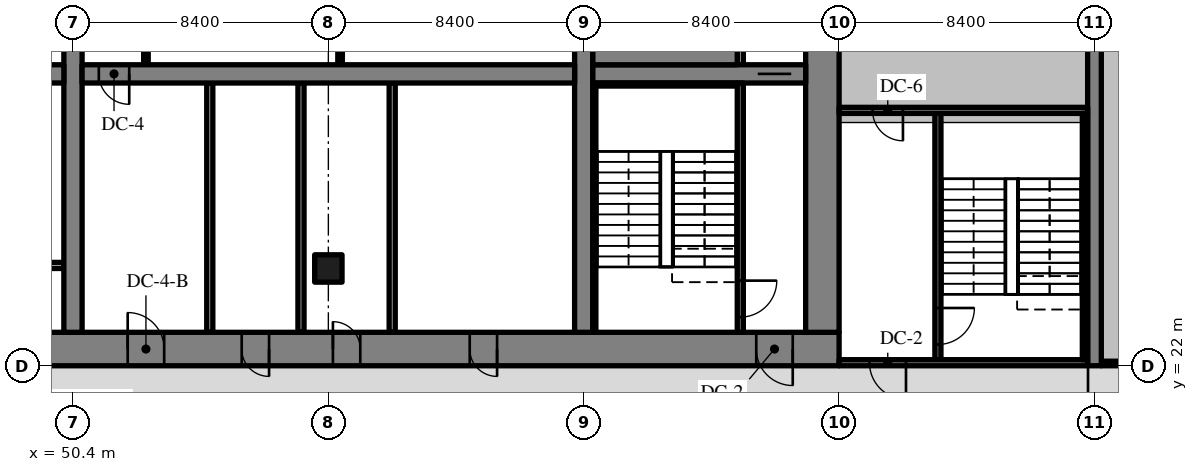
"""IFC4 building model, lengths in metres.
Left out: names, types, materials, properties, quantities, classifications, styles, units other than length and angle.
Written with IfcOpenShell. Run it as: python <this file> out.ifc"""

import sys

from ifc_helpers import new_model, si_unit, direction, frame, frame_2d, origin, origin_2d, place, context, subcontext, project, spatial, rectangle, extrude, source, transform, mapped, element, fill, save


model = new_model("IFC4")
c1 = context("Model", 3, precision=1e-05, world=origin(), true_north=direction((0.0, 1.0)))
c2 = subcontext(c1, "Body", "Model", "MODEL_VIEW")
j1 = project(units=[si_unit("LENGTHUNIT", "METRE"), si_unit("PLANEANGLEUNIT", "RADIAN")], contexts=[c1])
p1 = place(None, origin())
s1 = spatial("IfcSite", under=j1, at=p1, CompositionType="ELEMENT")
p2 = place(p1, origin())
s2 = spatial("IfcBuilding", under=s1, at=p2, CompositionType="ELEMENT")
p3 = place(p2, frame((0.0, 0.0, -13.5)))
s3 = spatial("IfcBuildingStorey", under=s2, at=p3, CompositionType="ELEMENT", Elevation=-13.5)
m1 = source(origin(), c2, "Body", "SweptSolid", [
    extrude(rectangle(XDim=50.4, YDim=1.1, at=frame_2d((25.2, 0.0))), origin(), (0.0, 0.0, 1.0), 4.52),
])
p4 = place(p3, frame((25.2, 22.55, -0.3), z_axis=(0.0, 0.0, 1.0), x_axis=(1.0, 0.0, 0.0)))
e1 = element("IfcWall", 1, at=p4, inside=s3, PredefinedType="SHEAR", context=c2, shape_type="MappedRepresentation", body=[
    mapped(m1, transform((0.0, 0.0, 0.0), scale=1.0)),
])
m2 = source(origin(), c2, "Body", "SweptSolid", [
    extrude(rectangle(XDim=1.8, YDim=2.1, at=frame_2d((0.9, 1.05))), frame((0.0, 0.56, 0.0), z_axis=(0.0, -1.0, 0.0), x_axis=(1.0, 0.0, 0.0)), (0.0, 0.0, 1.0), 1.12),
])
p5 = place(p4, frame((15.9, 0.0, 0.0)))
e2 = element("IfcOpeningElement", 2, at=p5, cuts=e1, PredefinedType="OPENING", context=c2, shape_type="MappedRepresentation", body=[
    mapped(m2, transform((0.0, 0.0, 0.0), scale=1.0)),
])
m3 = source(origin(), c2, "Body", "SweptSolid", [
    extrude(rectangle(XDim=1.2, YDim=2.1, at=frame_2d((0.6, 1.05))), frame((0.0, 0.56, 0.0), z_axis=(0.0, -1.0, 0.0), x_axis=(1.0, 0.0, 0.0)), (0.0, 0.0, 1.0), 1.12),
])
p6 = place(p4, frame((27.0, 0.0, 0.0)))
e3 = element("IfcOpeningElement", 3, at=p6, cuts=e1, PredefinedType="OPENING", context=c2, shape_type="MappedRepresentation", body=[
    mapped(m3, transform((0.0, 0.0, 0.0), scale=1.0)),
])
m4 = source(origin(), c2, "Body", "SweptSolid", [
    extrude(rectangle(XDim=0.9, YDim=2.1, at=frame_2d((0.45, 1.05))), frame((0.0, 0.56, 0.0), z_axis=(0.0, -1.0, 0.0), x_axis=(1.0, 0.0, 0.0)), (0.0, 0.0, 1.0), 1.12),
])
p7 = place(p4, frame((33.75, 0.0, 0.0)))
e4 = element("IfcOpeningElement", 4, at=p7, cuts=e1, PredefinedType="OPENING", context=c2, shape_type="MappedRepresentation", body=[
    mapped(m4, transform((0.0, 0.0, 0.0), scale=1.0)),
])
p8 = place(p4, frame((30.75, 0.0, 0.0)))
e5 = element("IfcOpeningElement", 5, at=p8, cuts=e1, PredefinedType="OPENING", context=c2, shape_type="MappedRepresentation", body=[
    mapped(m4, transform((0.0, 0.0, 0.0), scale=1.0)),
])
p9 = place(p4, frame((38.25, 0.0, 0.0)))
e6 = element("IfcOpeningElement", 6, at=p9, cuts=e1, PredefinedType="OPENING", context=c2, shape_type="MappedRepresentation", body=[
    mapped(m4, transform((0.0, 0.0, 0.0), scale=1.0)),
])
p10 = place(p4, frame((6.425, 0.0, 0.0)))
e7 = element("IfcOpeningElement", 7, at=p10, cuts=e1, PredefinedType="OPENING", context=c2, shape_type="MappedRepresentation", body=[
    mapped(m3, transform((0.0, 0.0, 0.0), scale=1.0)),
])
p11 = place(p4, frame((47.675, 0.0, 0.0)))
e8 = element("IfcOpeningElement", 8, at=p11, cuts=e1, PredefinedType="OPENING", context=c2, shape_type="MappedRepresentation", body=[
    mapped(m3, transform((0.0, 0.0, 0.0), scale=1.0)),
])
m5 = source(origin(), c2, "Body", "SweptSolid", [
    extrude(rectangle(XDim=17.8, YDim=1.1, at=frame_2d((8.9, 0.0))), origin(), (0.0, 0.0, 1.0), 4.52),
])
p12 = place(p3, frame((75.05, 23.1, -0.3), z_axis=(0.0, 0.0, 1.0), x_axis=(0.0, 1.0, 0.0)))
e9 = element("IfcWall", 9, at=p12, inside=s3, PredefinedType="SHEAR", context=c2, shape_type="MappedRepresentation", body=[
    mapped(m5, transform((0.0, 0.0, 0.0), scale=1.0)),
])
m6 = source(origin(), c2, "Body", "SweptSolid", [
    extrude(rectangle(XDim=17.8, YDim=0.6, at=frame_2d((8.9, 0.0))), origin(), (0.0, 0.0, 1.0), 4.52),
])
p13 = place(p3, frame((50.4, 23.1, -0.3), z_axis=(0.0, 0.0, 1.0), x_axis=(0.0, 1.0, 0.0)))
e10 = element("IfcWall", 10, at=p13, inside=s3, PredefinedType="SHEAR", context=c2, shape_type="MappedRepresentation", body=[
    mapped(m6, transform((0.0, 0.0, 0.0), scale=1.0)),
])
m7 = source(origin(), c2, "Body", "SweptSolid", [
    extrude(rectangle(XDim=1.1, YDim=2.1, at=frame_2d((0.55, 1.05))), frame((0.0, 0.31, 0.0), z_axis=(0.0, -1.0, 0.0), x_axis=(1.0, 0.0, 0.0)), (0.0, 0.0, 1.0), 0.62),
])
p14 = place(p13, frame((12.35, 0.0, 0.0)))
e11 = element("IfcOpeningElement", 11, at=p14, cuts=e10, PredefinedType="OPENING", context=c2, shape_type="MappedRepresentation", body=[
    mapped(m7, transform((0.0, 0.0, 0.0), scale=1.0)),
])
p15 = place(p3, frame((67.2, 23.1, -0.3), z_axis=(0.0, 0.0, 1.0), x_axis=(0.0, 1.0, 0.0)))
e12 = element("IfcWall", 12, at=p15, inside=s3, PredefinedType="SHEAR", context=c2, shape_type="MappedRepresentation", body=[
    mapped(m6, transform((0.0, 0.0, 0.0), scale=1.0)),
])
m8 = source(origin(), c2, "Body", "SweptSolid", [
    extrude(rectangle(XDim=16.2, YDim=0.6, at=frame_2d((8.1, 0.0))), origin(), (0.0, 0.0, 1.0), 4.52),
])
p16 = place(p3, frame((33.9, 31.6, -0.3), z_axis=(0.0, 0.0, 1.0), x_axis=(1.0, 0.0, 0.0)))
e13 = element("IfcWall", 13, at=p16, inside=s3, PredefinedType="SHEAR", context=c2, shape_type="MappedRepresentation", body=[
    mapped(m8, transform((0.0, 0.0, 0.0), scale=1.0)),
])
m9 = source(origin(), c2, "Body", "SweptSolid", [
    extrude(rectangle(XDim=1.0, YDim=2.1, at=frame_2d((0.5, 1.05))), frame((0.0, 0.31, 0.0), z_axis=(0.0, -1.0, 0.0), x_axis=(1.0, 0.0, 0.0)), (0.0, 0.0, 1.0), 0.62),
])
p17 = place(p16, frame((14.65, 0.0, 0.0)))
e14 = element("IfcOpeningElement", 14, at=p17, cuts=e13, PredefinedType="OPENING", context=c2, shape_type="MappedRepresentation", body=[
    mapped(m9, transform((0.0, 0.0, 0.0), scale=1.0)),
])
m10 = source(origin(), c2, "Body", "SweptSolid", [
    extrude(rectangle(XDim=16.2, YDim=0.6, at=frame_2d((8.1, 0.0))), origin(), (0.0, 0.0, 1.0), 4.52),
])
p18 = place(p3, frame((50.7, 31.6, -0.3), z_axis=(0.0, 0.0, 1.0), x_axis=(1.0, 0.0, 0.0)))
e15 = element("IfcWall", 15, at=p18, inside=s3, PredefinedType="SHEAR", context=c2, shape_type="MappedRepresentation", body=[
    mapped(m10, transform((0.0, 0.0, 0.0), scale=1.0)),
])
p19 = place(p18, frame((0.55, 0.0, 0.0)))
e16 = element("IfcOpeningElement", 16, at=p19, cuts=e15, PredefinedType="OPENING", context=c2, shape_type="MappedRepresentation", body=[
    mapped(m9, transform((0.0, 0.0, 0.0), scale=1.0)),
])
m11 = source(origin(), c2, "Body", "SweptSolid", [
    extrude(rectangle(XDim=7.0, YDim=0.6, at=frame_2d((3.5, 0.0))), origin(), (0.0, 0.0, 1.0), 4.52),
])
p20 = place(p3, frame((67.5, 31.6, -0.3), z_axis=(0.0, 0.0, 1.0), x_axis=(1.0, 0.0, 0.0)))
e17 = element("IfcWall", 17, at=p20, inside=s3, PredefinedType="SHEAR", context=c2, shape_type="MappedRepresentation", body=[
    mapped(m11, transform((0.0, 0.0, 0.0), scale=1.0)),
])
p21 = place(p20, frame((5.425, 0.0, 0.0)))
e18 = element("IfcOpeningElement", 18, at=p21, cuts=e17, PredefinedType="OPENING", context=c2, shape_type="MappedRepresentation", body=[
    mapped(m7, transform((0.0, 0.0, 0.0), scale=1.0)),
])
m12 = source(origin(), c2, "Body", "SweptSolid", [
    extrude(rectangle(XDim=20.0, YDim=0.45, at=frame_2d((10.0, 0.0))), origin(), (0.0, 0.0, 1.0), 4.52),
])
p22 = place(p3, frame((84.0, 22.0, -0.3), z_axis=(0.0, 0.0, 1.0), x_axis=(0.0, 1.0, 0.0)))
e19 = element("IfcWall", 19, at=p22, inside=s3, PredefinedType="SHEAR", context=c2, shape_type="MappedRepresentation", body=[
    mapped(m12, transform((0.0, 0.0, 0.0), scale=1.0)),
])
m13 = source(origin(), c2, "Body", "SweptSolid", [
    extrude(rectangle(XDim=0.9, YDim=0.9, at=origin_2d()), origin(), (0.0, 0.0, 1.0), 4.52),
])
p23 = place(p3, frame((58.8, 25.2, -0.3), z_axis=(0.0, 0.0, 1.0), x_axis=(1.0, 0.0, 0.0)))
e20 = element("IfcColumn", 20, at=p23, inside=s3, PredefinedType="COLUMN", context=c2, shape_type="MappedRepresentation", body=[
    mapped(m13, transform((0.0, 0.0, 0.0), scale=1.0)),
])
m14 = source(origin(), c2, "Body", "SweptSolid", [
    extrude(rectangle(XDim=6.0, YDim=0.2, at=frame_2d((3.0, 0.0))), origin(), (0.0, 0.0, 1.0), 4.22),
])
p24 = place(p3, frame((44.1, 25.3, 0.0), z_axis=(0.0, 0.0, 1.0), x_axis=(1.0, 0.0, 0.0)))
e21 = element("IfcWall", 21, at=p24, inside=s3, PredefinedType="SOLIDWALL", context=c2, shape_type="MappedRepresentation", body=[
    mapped(m14, transform((0.0, 0.0, 0.0), scale=1.0)),
])
m15 = source(origin(), c2, "Body", "SweptSolid", [
    extrude(rectangle(XDim=1.1, YDim=2.1, at=frame_2d((0.55, 1.05))), frame((0.0, 0.11, 0.0), z_axis=(0.0, -1.0, 0.0), x_axis=(1.0, 0.0, 0.0)), (0.0, 0.0, 1.0), 0.22),
])
p25 = place(p24, frame((0.95, 0.0, 0.0)))
e22 = element("IfcOpeningElement", 22, at=p25, cuts=e21, PredefinedType="OPENING", context=c2, shape_type="MappedRepresentation", body=[
    mapped(m15, transform((0.0, 0.0, 0.0), scale=1.0)),
])
p26 = place(p24, frame((3.95, 0.0, 0.0)))
e23 = element("IfcOpeningElement", 23, at=p26, cuts=e21, PredefinedType="OPENING", context=c2, shape_type="MappedRepresentation", body=[
    mapped(m15, transform((0.0, 0.0, 0.0), scale=1.0)),
])
m16 = source(origin(), c2, "Body", "SweptSolid", [
    extrude(rectangle(XDim=8.2, YDim=0.2, at=frame_2d((4.1, 0.0))), origin(), (0.0, 0.0, 1.0), 4.22),
])
for number, where, z_axis, x_axis in (
    (24, (54.9, 23.1, 0.0), (0.0, 0.0, 1.0), (0.0, 1.0, 0.0)),
    (25, (60.9, 23.1, 0.0), (0.0, 0.0, 1.0), (0.0, 1.0, 0.0)),
    (26, (57.9, 23.1, 0.0), (0.0, 0.0, 1.0), (0.0, 1.0, 0.0)),
):
    element("IfcWall", number, at=place(p3, frame(where, z_axis=z_axis, x_axis=x_axis)), inside=s3, PredefinedType="PARTITIONING", context=c2, shape_type="MappedRepresentation", body=[
        mapped(m16, transform((0.0, 0.0, 0.0), scale=1.0)),
    ])
m17 = source(origin(), c2, "Body", "SweptSolid", [
    extrude(rectangle(XDim=3.1, YDim=0.15, at=frame_2d((1.55, 0.0))), origin(), (0.0, 0.0, 1.0), 4.22),
])
for number, where, z_axis, x_axis in (
    (27, (52.8, 31.9, 0.0), (0.0, 0.0, 1.0), (0.0, 1.0, 0.0)),
    (28, (59.186, 31.9, 0.0), (0.0, 0.0, 1.0), (0.0, 1.0, 0.0)),
):
    element("IfcWall", number, at=place(p3, frame(where, z_axis=z_axis, x_axis=x_axis)), inside=s3, PredefinedType="PARTITIONING", context=c2, shape_type="MappedRepresentation", body=[
        mapped(m17, transform((0.0, 0.0, 0.0), scale=1.0)),
    ])
m18 = source(origin(), c2, "Body", "SweptSolid", [
    extrude(rectangle(XDim=8.2, YDim=0.2, at=frame_2d((4.1, 0.0))), origin(), (0.0, 0.0, 1.0), 4.52),
])
p27 = place(p3, frame((72.35, 23.1, -0.3), z_axis=(0.0, 0.0, 1.0), x_axis=(0.0, 1.0, 0.0)))
e29 = element("IfcWall", 29, at=p27, inside=s3, PredefinedType="SOLIDWALL", context=c2, shape_type="MappedRepresentation", body=[
    mapped(m18, transform((0.0, 0.0, 0.0), scale=1.0)),
])
m19 = source(origin(), c2, "Body", "SweptSolid", [
    extrude(rectangle(XDim=1.2, YDim=2.1, at=frame_2d((0.6, 1.05))), frame((0.0, 0.11, 0.0), z_axis=(0.0, -1.0, 0.0), x_axis=(1.0, 0.0, 0.0)), (0.0, 0.0, 1.0), 0.22),
])
p28 = place(p27, frame((0.5, 0.0, 0.0)))
e30 = element("IfcOpeningElement", 30, at=p28, cuts=e29, PredefinedType="OPENING", context=c2, shape_type="MappedRepresentation", body=[
    mapped(m19, transform((0.0, 0.0, 0.0), scale=1.0)),
])
m20 = source(origin(), c2, "Body", "SweptSolid", [
    extrude(rectangle(XDim=1.7, YDim=0.2, at=frame_2d((0.85, 0.0))), origin(), (0.0, 0.0, 1.0), 4.22),
])
p29 = place(p3, frame((72.35, 31.9, 0.0), z_axis=(0.0, 0.0, 1.0), x_axis=(0.0, 1.0, 0.0)))
e31 = element("IfcWall", 31, at=p29, inside=s3, PredefinedType="SOLIDWALL", context=c2, shape_type="MappedRepresentation", body=[
    mapped(m20, transform((0.0, 0.0, 0.0), scale=1.0)),
])
m21 = source(origin(), c2, "Body", "SweptSolid", [
    extrude(rectangle(XDim=8.3, YDim=0.2, at=frame_2d((4.15, 0.0))), origin(), (0.0, 0.0, 1.0), 4.52),
])
p30 = place(p3, frame((78.85, 22.1, -0.3), z_axis=(0.0, 0.0, 1.0), x_axis=(0.0, 1.0, 0.0)))
e32 = element("IfcWall", 32, at=p30, inside=s3, PredefinedType="SOLIDWALL", context=c2, shape_type="MappedRepresentation", body=[
    mapped(m21, transform((0.0, 0.0, 0.0), scale=1.0)),
])
p31 = place(p30, frame((0.6, 0.0, 0.0)))
e33 = element("IfcOpeningElement", 33, at=p31, cuts=e32, PredefinedType="OPENING", context=c2, shape_type="MappedRepresentation", body=[
    mapped(m19, transform((0.0, 0.0, 0.0), scale=1.0)),
])
m22 = source(origin(), c2, "Body", "SweptSolid", [
    extrude(rectangle(XDim=8.175, YDim=0.2, at=frame_2d((4.087, 0.0))), origin(), (0.0, 0.0, 1.0), 4.52),
])
p32 = place(p3, frame((83.775, 22.1, -0.3), z_axis=(0.0, 0.0, 1.0), x_axis=(-1.0, 0.0, 0.0)))
e34 = element("IfcWall", 34, at=p32, inside=s3, PredefinedType="SOLIDWALL", context=c2, shape_type="MappedRepresentation", body=[
    mapped(m22, transform((0.0, 0.0, 0.0), scale=1.0)),
])
p33 = place(p32, frame((5.975, 0.0, 0.0)))
e35 = element("IfcOpeningElement", 35, at=p33, cuts=e34, PredefinedType="OPENING", context=c2, shape_type="MappedRepresentation", body=[
    mapped(m19, transform((0.0, 0.0, 0.0), scale=1.0)),
])
p34 = place(p3, frame((83.775, 30.4, -0.3), z_axis=(0.0, 0.0, 1.0), x_axis=(-1.0, 0.0, 0.0)))
e36 = element("IfcWall", 36, at=p34, inside=s3, PredefinedType="SOLIDWALL", context=c2, shape_type="MappedRepresentation", body=[
    mapped(m22, transform((0.0, 0.0, 0.0), scale=1.0)),
])
m23 = source(origin(), c2, "Body", "SweptSolid", [
    extrude(rectangle(XDim=1.0, YDim=2.1, at=frame_2d((0.5, 1.05))), frame((0.0, 0.11, 0.0), z_axis=(0.0, -1.0, 0.0), x_axis=(1.0, 0.0, 0.0)), (0.0, 0.0, 1.0), 0.22),
])
p35 = place(p34, frame((6.075, 0.0, 0.0)))
e37 = element("IfcOpeningElement", 37, at=p35, cuts=e36, PredefinedType="OPENING", context=c2, shape_type="MappedRepresentation", body=[
    mapped(m23, transform((0.0, 0.0, 0.0), scale=1.0)),
])
m24 = source(origin(), c2, "Body", "SweptSolid", [
    extrude(rectangle(XDim=4.75, YDim=0.1, at=frame_2d((2.375, 0.0))), origin(), (0.0, 0.0, 1.0), 4.52),
])
p36 = place(p3, frame((67.5, 31.25, -0.3), z_axis=(0.0, 0.0, 1.0), x_axis=(1.0, 0.0, 0.0)))
e38 = element("IfcWall", 38, at=p36, inside=s3, PredefinedType="SOLIDWALL", context=c2, shape_type="MappedRepresentation", body=[
    mapped(m24, transform((0.0, 0.0, 0.0), scale=1.0)),
])
m25 = source(origin(), c2, "Body", "SweptSolid", [
    extrude(rectangle(XDim=8.1, YDim=0.1, at=frame_2d((4.05, 0.0))), origin(), (0.0, 0.0, 1.0), 4.52),
])
p37 = place(p3, frame((67.55, 23.1, -0.3), z_axis=(0.0, 0.0, 1.0), x_axis=(0.0, 1.0, 0.0)))
e39 = element("IfcWall", 39, at=p37, inside=s3, PredefinedType="SOLIDWALL", context=c2, shape_type="MappedRepresentation", body=[
    mapped(m25, transform((0.0, 0.0, 0.0), scale=1.0)),
])
m26 = source(origin(), c2, "Body", "SweptSolid", [
    extrude(rectangle(XDim=4.75, YDim=0.9, at=frame_2d((2.375, 0.0))), origin(), (0.0, 0.0, 1.0), 4.52),
])
p38 = place(p3, frame((67.5, 32.35, -0.3), z_axis=(0.0, 0.0, 1.0), x_axis=(1.0, 0.0, 0.0)))
e40 = element("IfcWall", 40, at=p38, inside=s3, PredefinedType="SOLIDWALL", context=c2, shape_type="MappedRepresentation", body=[
    mapped(m26, transform((0.0, 0.0, 0.0), scale=1.0)),
])
m27 = source(origin(), c2, "Body", "SweptSolid", [
    extrude(rectangle(XDim=8.1, YDim=0.175, at=frame_2d((4.05, 0.0))), origin(), (0.0, 0.0, 1.0), 4.52),
])
p39 = place(p3, frame((83.688, 22.2, -0.3), z_axis=(0.0, 0.0, 1.0), x_axis=(0.0, 1.0, 0.0)))
e41 = element("IfcWall", 41, at=p39, inside=s3, PredefinedType="SOLIDWALL", context=c2, shape_type="MappedRepresentation", body=[
    mapped(m27, transform((0.0, 0.0, 0.0), scale=1.0)),
])
m28 = source(origin(), c2, "Body", "SweptSolid", [
    extrude(rectangle(XDim=7.95, YDim=0.15, at=frame_2d((3.975, 0.0))), origin(), (0.0, 0.0, 1.0), 4.22),
])
p40 = place(p3, frame((84.225, 22.075, 0.0), z_axis=(0.0, 0.0, 1.0), x_axis=(1.0, 0.0, 0.0)))
e42 = element("IfcWall", 42, at=p40, inside=s3, PredefinedType="PARTITIONING", context=c2, shape_type="MappedRepresentation", body=[
    mapped(m28, transform((0.0, 0.0, 0.0), scale=1.0)),
])
m29 = source(origin(), c2, "Body", "SweptSolid", [
    extrude(rectangle(XDim=1.2, YDim=2.1, at=frame_2d((0.6, 1.05))), frame((0.0, 0.325, 0.0), z_axis=(0.0, -1.0, 0.0), x_axis=(1.0, 0.0, 0.0)), (0.0, 0.0, 1.0), 0.05),
])
p41 = place(p6, origin())
e43 = element("IfcDoor", 43, at=p41, inside=s3, OperationType="SINGLE_SWING_LEFT", PredefinedType="DOOR", context=c2, shape_type="MappedRepresentation", body=[
    mapped(m29, transform((0.0, 0.0, 0.0), scale=1.0)),
])
fill(e3, e43)
m30 = source(origin(), c2, "Body", "SweptSolid", [
    extrude(rectangle(XDim=1.0, YDim=2.1, at=frame_2d((0.5, 1.05))), frame((0.0, 0.025, 0.0), z_axis=(0.0, -1.0, 0.0), x_axis=(1.0, 0.0, 0.0)), (0.0, 0.0, 1.0), 0.05),
])
p42 = place(p19, origin())
e44 = element("IfcDoor", 44, at=p42, inside=s3, OperationType="SINGLE_SWING_RIGHT", PredefinedType="DOOR", context=c2, shape_type="MappedRepresentation", body=[
    mapped(m30, transform((0.0, 0.0, 0.0), scale=1.0)),
])
fill(e16, e44)
m31 = source(origin(), c2, "Body", "SweptSolid", [
    extrude(rectangle(XDim=0.9, YDim=2.1, at=frame_2d((0.45, 1.05))), frame((0.0, 0.325, 0.0), z_axis=(0.0, -1.0, 0.0), x_axis=(1.0, 0.0, 0.0)), (0.0, 0.0, 1.0), 0.05),
])
p43 = place(p7, origin())
e45 = element("IfcDoor", 45, at=p43, inside=s3, OperationType="SINGLE_SWING_LEFT", PredefinedType="DOOR", context=c2, shape_type="MappedRepresentation", body=[
    mapped(m31, transform((0.0, 0.0, 0.0), scale=1.0)),
])
fill(e4, e45)
p44 = place(p8, origin())
e46 = element("IfcDoor", 46, at=p44, inside=s3, OperationType="SINGLE_SWING_RIGHT", PredefinedType="DOOR", context=c2, shape_type="MappedRepresentation", body=[
    mapped(m31, transform((0.0, 0.0, 0.0), scale=1.0)),
])
fill(e5, e46)
p45 = place(p9, origin())
e47 = element("IfcDoor", 47, at=p45, inside=s3, OperationType="SINGLE_SWING_RIGHT", PredefinedType="DOOR", context=c2, shape_type="MappedRepresentation", body=[
    mapped(m31, transform((0.0, 0.0, 0.0), scale=1.0)),
])
fill(e6, e47)
m32 = source(origin(), c2, "Body", "SweptSolid", [
    extrude(rectangle(XDim=1.2, YDim=2.1, at=frame_2d((0.6, 1.05))), frame((0.0, 0.025, 0.0), z_axis=(0.0, -1.0, 0.0), x_axis=(1.0, 0.0, 0.0)), (0.0, 0.0, 1.0), 0.05),
])
p46 = place(p28, origin())
e48 = element("IfcDoor", 48, at=p46, inside=s3, OperationType="SINGLE_SWING_RIGHT", PredefinedType="DOOR", context=c2, shape_type="MappedRepresentation", body=[
    mapped(m32, transform((0.0, 0.0, 0.0), scale=1.0)),
])
fill(e30, e48)
p47 = place(p11, origin())
e49 = element("IfcDoor", 49, at=p47, inside=s3, OperationType="SINGLE_SWING_RIGHT", PredefinedType="DOOR", context=c2, shape_type="MappedRepresentation", body=[
    mapped(m29, transform((0.0, 0.0, 0.0), scale=1.0)),
])
fill(e8, e49)
m33 = source(origin(), c2, "Body", "SweptSolid", [
    extrude(rectangle(XDim=1.1, YDim=2.1, at=frame_2d((0.55, 1.05))), frame((0.0, 0.025, 0.0), z_axis=(0.0, -1.0, 0.0), x_axis=(1.0, 0.0, 0.0)), (0.0, 0.0, 1.0), 0.05),
])
p48 = place(p21, origin())
e50 = element("IfcDoor", 50, at=p48, inside=s3, OperationType="SLIDING_TO_RIGHT", PredefinedType="DOOR", context=c2, shape_type="MappedRepresentation", body=[
    mapped(m33, transform((0.0, 0.0, 0.0), scale=1.0)),
])
fill(e18, e50)
p49 = place(p31, origin())
e51 = element("IfcDoor", 51, at=p49, inside=s3, OperationType="SINGLE_SWING_RIGHT", PredefinedType="DOOR", context=c2, shape_type="MappedRepresentation", body=[
    mapped(m32, transform((0.0, 0.0, 0.0), scale=1.0)),
])
fill(e33, e51)
p50 = place(p33, origin())
e52 = element("IfcDoor", 52, at=p50, inside=s3, OperationType="SINGLE_SWING_LEFT", PredefinedType="DOOR", context=c2, shape_type="MappedRepresentation", body=[
    mapped(m32, transform((0.0, 0.0, 0.0), scale=1.0)),
])
fill(e35, e52)
p51 = place(p35, origin())
e53 = element("IfcDoor", 53, at=p51, inside=s3, OperationType="SINGLE_SWING_LEFT", PredefinedType="DOOR", context=c2, shape_type="MappedRepresentation", body=[
    mapped(m30, transform((0.0, 0.0, 0.0), scale=1.0)),
])
fill(e37, e53)
save(model, sys.argv[1])
